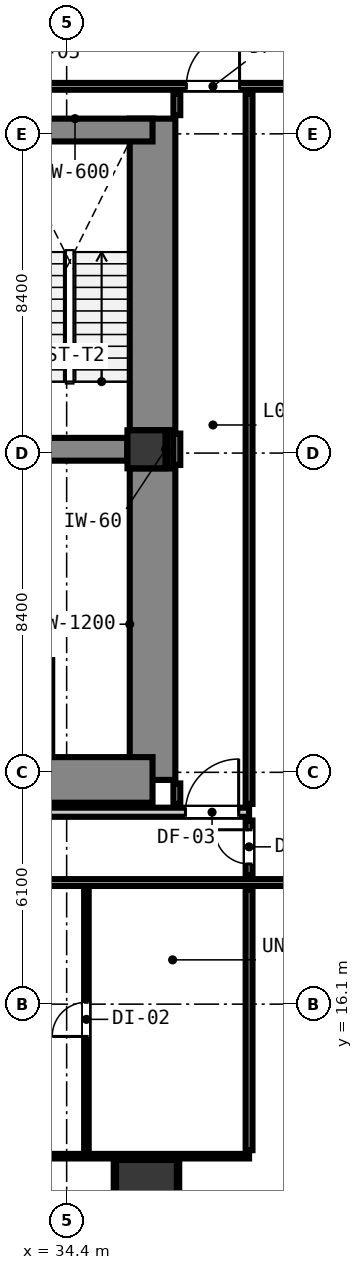
"""IFC4 building model, lengths in metres.
Left out: names, types, materials, properties, quantities, classifications, styles, units other than length and angle.
Written with IfcOpenShell. Run it as: python <this file> out.ifc"""

import sys

from ifc_helpers import new_model, si_unit, direction, frame, frame_2d, origin, origin_2d, place, context, subcontext, project, spatial, rectangle, extrude, element, fill, save


model = new_model("IFC4")
c1 = context("Model", 3, precision=1e-05, world=origin(), true_north=direction((0.0, 1.0)))
c2 = subcontext(c1, "Body", "Model", "MODEL_VIEW")
j1 = project(units=[si_unit("LENGTHUNIT", "METRE"), si_unit("PLANEANGLEUNIT", "RADIAN")], contexts=[c1])
p1 = place(None, origin())
s1 = spatial("IfcSite", under=j1, at=p1, CompositionType="ELEMENT")
p2 = place(p1, origin())
s2 = spatial("IfcBuilding", under=s1, at=p2, CompositionType="ELEMENT")
p3 = place(p2, frame((0.0, 0.0, 5.2)))
s3 = spatial("IfcBuildingStorey", under=s2, at=p3, CompositionType="ELEMENT", Elevation=5.2)
p4 = place(p3, frame((36.5, 30.7, 0.0), z_axis=(0.0, 0.0, 1.0), x_axis=(1.0, 0.0, 0.0)))
e1 = element("IfcColumn", 1, at=p4, inside=s3, PredefinedType="COLUMN", context=c2, shape_type="SweptSolid", body=[
    extrude(rectangle(XDim=1.0, YDim=1.0, at=origin_2d()), origin(), (0.0, 0.0, 1.0), 4.2),
])
p5 = place(p3, frame((36.66, 22.0, 0.0), z_axis=(0.0, 0.0, 1.0), x_axis=(0.0, 1.0, 0.0)))
e2 = element("IfcWall", 2, at=p5, inside=s3, PredefinedType="SHEAR", context=c2, shape_type="SweptSolid", body=[
    extrude(rectangle(XDim=8.195, YDim=1.2, at=frame_2d((4.098, 0.0))), origin(), (0.0, 0.0, 1.0), 4.2),
])
p6 = place(p3, frame((36.66, 31.205, 0.0), z_axis=(0.0, 0.0, 1.0), x_axis=(0.0, 1.0, 0.0)))
e3 = element("IfcWall", 3, at=p6, inside=s3, PredefinedType="SHEAR", context=c2, shape_type="SweptSolid", body=[
    extrude(rectangle(XDim=8.195, YDim=1.2, at=frame_2d((4.097, 0.0))), origin(), (0.0, 0.0, 1.0), 4.2),
])
p7 = place(p3, frame((29.705, 22.0, 0.0), z_axis=(0.0, 0.0, 1.0), x_axis=(1.0, 0.0, 0.0)))
e4 = element("IfcWall", 4, at=p7, inside=s3, PredefinedType="SHEAR", context=c2, shape_type="SweptSolid", body=[
    extrude(rectangle(XDim=6.955, YDim=1.2, at=frame_2d((3.478, 0.0))), origin(), (0.0, 0.0, 1.0), 4.2),
])
p8 = place(p3, frame((32.58, 39.1, 0.0), z_axis=(0.0, 0.0, 1.0), x_axis=(1.0, 0.0, 0.0)))
e5 = element("IfcWall", 5, at=p8, inside=s3, PredefinedType="SHEAR", context=c2, shape_type="SweptSolid", body=[
    extrude(rectangle(XDim=4.08, YDim=0.6, at=frame_2d((2.04, 0.0))), origin(), (0.0, 0.0, 1.0), 4.2),
])
p9 = place(p3, frame((32.58, 30.7, 0.0), z_axis=(0.0, 0.0, 1.0), x_axis=(1.0, 0.0, 0.0)))
e6 = element("IfcWall", 6, at=p9, inside=s3, PredefinedType="SHEAR", context=c2, shape_type="SweptSolid", body=[
    extrude(rectangle(XDim=3.415, YDim=0.6, at=frame_2d((1.708, 0.0))), origin(), (0.0, 0.0, 1.0), 4.2),
])
p10 = place(p3, frame((36.5, 11.2, 0.0), z_axis=(0.0, 0.0, 1.0), x_axis=(1.0, 0.0, 0.0)))
e7 = element("IfcColumn", 7, at=p10, inside=s3, PredefinedType="COLUMN", context=c2, shape_type="SweptSolid", body=[
    extrude(rectangle(XDim=1.6, YDim=1.6, at=origin_2d()), origin(), (0.0, 0.0, 1.0), 4.2),
])
p11 = place(p3, frame((33.9, 22.73, 0.0), z_axis=(0.0, 0.0, 1.0), x_axis=(0.0, 1.0, 0.0)))
e8 = element("IfcWall", 8, at=p11, inside=s3, PredefinedType="PARTITIONING", context=c2, shape_type="SweptSolid", body=[
    extrude(rectangle(XDim=2.422, YDim=0.24, at=frame_2d((1.211, 0.0))), origin(), (0.0, 0.0, 1.0), 3.92),
])
p12 = place(p3, frame((10.5, 21.15, 0.0), z_axis=(0.0, 0.0, 1.0), x_axis=(1.0, 0.0, 0.0)))
e9 = element("IfcWall", 9, at=p12, inside=s3, PredefinedType="PARTITIONING", context=c2, shape_type="SweptSolid", body=[
    extrude(rectangle(XDim=28.7, YDim=0.24, at=frame_2d((14.35, 0.0))), origin(), (0.0, 0.0, 1.0), 3.92),
])
p13 = place(p12, frame((7.71, 0.0, 0.0)))
e10 = element("IfcOpeningElement", 10, at=p13, cuts=e9, PredefinedType="OPENING", context=c2, shape_type="SweptSolid", body=[
    extrude(rectangle(XDim=1.1, YDim=2.15, at=frame_2d((0.55, 1.075))), frame((0.0, 0.13, 0.0), z_axis=(0.0, -1.0, 0.0), x_axis=(1.0, 0.0, 0.0)), (0.0, 0.0, 1.0), 0.26),
])
p14 = place(p12, frame((0.324, 0.0, 0.0)))
e11 = element("IfcOpeningElement", 11, at=p14, cuts=e9, PredefinedType="OPENING", context=c2, shape_type="SweptSolid", body=[
    extrude(rectangle(XDim=1.4, YDim=2.15, at=frame_2d((0.7, 1.075))), frame((0.0, 0.13, 0.0), z_axis=(0.0, -1.0, 0.0), x_axis=(1.0, 0.0, 0.0)), (0.0, 0.0, 1.0), 0.26),
])
p15 = place(p12, frame((27.026, 0.0, 0.0)))
e12 = element("IfcOpeningElement", 12, at=p15, cuts=e9, PredefinedType="OPENING", context=c2, shape_type="SweptSolid", body=[
    extrude(rectangle(XDim=1.4, YDim=2.15, at=frame_2d((0.7, 1.075))), frame((0.0, 0.13, 0.0), z_axis=(0.0, -1.0, 0.0), x_axis=(1.0, 0.0, 0.0)), (0.0, 0.0, 1.0), 0.26),
])
p16 = place(p3, frame((4.352, 19.3, 0.0), z_axis=(0.0, 0.0, 1.0), x_axis=(1.0, 0.0, 0.0)))
e13 = element("IfcWall", 13, at=p16, inside=s3, PredefinedType="PARTITIONING", context=c2, shape_type="SweptSolid", body=[
    extrude(rectangle(XDim=43.296, YDim=0.18, at=frame_2d((21.648, 0.0))), origin(), (0.0, 0.0, 1.0), 3.92),
])
p17 = place(p16, frame((12.248, 0.0, 0.0)))
e14 = element("IfcOpeningElement", 14, at=p17, cuts=e13, PredefinedType="OPENING", context=c2, shape_type="SweptSolid", body=[
    extrude(rectangle(XDim=1.0, YDim=2.15, at=frame_2d((0.5, 1.075))), frame((0.0, 0.1, 0.0), z_axis=(0.0, -1.0, 0.0), x_axis=(1.0, 0.0, 0.0)), (0.0, 0.0, 1.0), 0.2),
])
p18 = place(p16, frame((27.998, 0.0, 0.0)))
e15 = element("IfcOpeningElement", 15, at=p18, cuts=e13, PredefinedType="OPENING", context=c2, shape_type="SweptSolid", body=[
    extrude(rectangle(XDim=1.0, YDim=2.15, at=frame_2d((0.5, 1.075))), frame((0.0, 0.1, 0.0), z_axis=(0.0, -1.0, 0.0), x_axis=(1.0, 0.0, 0.0)), (0.0, 0.0, 1.0), 0.2),
])
p19 = place(p3, frame((10.5, 40.25, 0.0), z_axis=(0.0, 0.0, 1.0), x_axis=(1.0, 0.0, 0.0)))
e16 = element("IfcWall", 16, at=p19, inside=s3, PredefinedType="PARTITIONING", context=c2, shape_type="SweptSolid", body=[
    extrude(rectangle(XDim=37.148, YDim=0.18, at=frame_2d((18.574, 0.0))), origin(), (0.0, 0.0, 1.0), 3.92),
])
p20 = place(p19, frame((6.935, 0.0, 0.0)))
e17 = element("IfcOpeningElement", 17, at=p20, cuts=e16, PredefinedType="OPENING", context=c2, shape_type="SweptSolid", body=[
    extrude(rectangle(XDim=1.4, YDim=2.15, at=frame_2d((0.7, 1.075))), frame((0.0, 0.1, 0.0), z_axis=(0.0, -1.0, 0.0), x_axis=(1.0, 0.0, 0.0)), (0.0, 0.0, 1.0), 0.2),
])
p21 = place(p19, frame((0.324, 0.0, 0.0)))
e18 = element("IfcOpeningElement", 18, at=p21, cuts=e16, PredefinedType="OPENING", context=c2, shape_type="SweptSolid", body=[
    extrude(rectangle(XDim=1.4, YDim=2.15, at=frame_2d((0.7, 1.075))), frame((0.0, 0.1, 0.0), z_axis=(0.0, -1.0, 0.0), x_axis=(1.0, 0.0, 0.0)), (0.0, 0.0, 1.0), 0.2),
])
p22 = place(p19, frame((27.05, 0.0, 0.0)))
e19 = element("IfcOpeningElement", 19, at=p22, cuts=e16, PredefinedType="OPENING", context=c2, shape_type="SweptSolid", body=[
    extrude(rectangle(XDim=1.4, YDim=2.15, at=frame_2d((0.7, 1.075))), frame((0.0, 0.1, 0.0), z_axis=(0.0, -1.0, 0.0), x_axis=(1.0, 0.0, 0.0)), (0.0, 0.0, 1.0), 0.2),
])
p23 = place(p3, frame((10.5, 12.1, 0.0), z_axis=(0.0, 0.0, 1.0), x_axis=(1.0, 0.0, 0.0)))
e20 = element("IfcWall", 20, at=p23, inside=s3, PredefinedType="PARTITIONING", context=c2, shape_type="SweptSolid", body=[
    extrude(rectangle(XDim=28.7, YDim=0.12, at=frame_2d((14.35, 0.0))), origin(), (0.0, 0.0, 1.0), 3.92),
])
p24 = place(p3, frame((37.3, 21.368, 0.0), z_axis=(0.0, 0.0, 1.0), x_axis=(0.0, 1.0, 0.0)))
e21 = element("IfcWall", 21, at=p24, inside=s3, PredefinedType="PARTITIONING", context=c2, shape_type="SweptSolid", body=[
    extrude(rectangle(XDim=0.54, YDim=0.18, at=frame_2d((0.27, 0.0))), origin(), (0.0, 0.0, 1.0), 3.92),
])
p25 = place(p3, frame((37.3, 30.287, 0.0), z_axis=(0.0, 0.0, 1.0), x_axis=(0.0, 1.0, 0.0)))
e22 = element("IfcWall", 22, at=p25, inside=s3, PredefinedType="PARTITIONING", context=c2, shape_type="SweptSolid", body=[
    extrude(rectangle(XDim=0.826, YDim=0.18, at=frame_2d((0.413, 0.0))), origin(), (0.0, 0.0, 1.0), 3.92),
])
p26 = place(p3, frame((37.3, 39.492, 0.0), z_axis=(0.0, 0.0, 1.0), x_axis=(0.0, 1.0, 0.0)))
e23 = element("IfcWall", 23, at=p26, inside=s3, PredefinedType="PARTITIONING", context=c2, shape_type="SweptSolid", body=[
    extrude(rectangle(XDim=0.57, YDim=0.18, at=frame_2d((0.285, 0.0))), origin(), (0.0, 0.0, 1.0), 3.92),
])
p27 = place(p3, frame((39.2, 12.258, 0.0), z_axis=(0.0, 0.0, 1.0), x_axis=(0.0, 1.0, 0.0)))
e24 = element("IfcWall", 24, at=p27, inside=s3, PredefinedType="PARTITIONING", context=c2, shape_type="SweptSolid", body=[
    extrude(rectangle(XDim=6.854, YDim=0.18, at=frame_2d((3.427, 0.0))), origin(), (0.0, 0.0, 1.0), 3.92),
])
p28 = place(p3, frame((39.2, 19.488, 0.0), z_axis=(0.0, 0.0, 1.0), x_axis=(0.0, 1.0, 0.0)))
e25 = element("IfcWall", 25, at=p28, inside=s3, PredefinedType="PARTITIONING", context=c2, shape_type="SweptSolid", body=[
    extrude(rectangle(XDim=1.444, YDim=0.18, at=frame_2d((0.722, 0.0))), origin(), (0.0, 0.0, 1.0), 3.92),
])
p29 = place(p28, frame((0.301, 0.0, 0.0)))
e26 = element("IfcOpeningElement", 26, at=p29, cuts=e25, PredefinedType="OPENING", context=c2, shape_type="SweptSolid", body=[
    extrude(rectangle(XDim=0.9, YDim=2.1, at=frame_2d((0.45, 1.05))), frame((0.0, 0.1, 0.0), z_axis=(0.0, -1.0, 0.0), x_axis=(1.0, 0.0, 0.0)), (0.0, 0.0, 1.0), 0.2),
])
p30 = place(p3, frame((39.2, 21.368, 0.0), z_axis=(0.0, 0.0, 1.0), x_axis=(0.0, 1.0, 0.0)))
e27 = element("IfcWall", 27, at=p30, inside=s3, PredefinedType="PARTITIONING", context=c2, shape_type="SweptSolid", body=[
    extrude(rectangle(XDim=18.694, YDim=0.18, at=frame_2d((9.347, 0.0))), origin(), (0.0, 0.0, 1.0), 3.92),
])
p31 = place(p3, frame((34.92, 12.228, 0.0), z_axis=(0.0, 0.0, 1.0), x_axis=(0.0, 1.0, 0.0)))
e28 = element("IfcWall", 28, at=p31, inside=s3, PredefinedType="PARTITIONING", context=c2, shape_type="SweptSolid", body=[
    extrude(rectangle(XDim=6.914, YDim=0.12, at=frame_2d((3.457, 0.0))), origin(), (0.0, 0.0, 1.0), 3.92),
])
p32 = place(p31, frame((3.022, 0.0, 0.0)))
e29 = element("IfcOpeningElement", 29, at=p32, cuts=e28, PredefinedType="OPENING", context=c2, shape_type="SweptSolid", body=[
    extrude(rectangle(XDim=0.9, YDim=2.1, at=frame_2d((0.45, 1.05))), frame((0.0, 0.07, 0.0), z_axis=(0.0, -1.0, 0.0), x_axis=(1.0, 0.0, 0.0)), (0.0, 0.0, 1.0), 0.14),
])
p33 = place(p3, frame((37.032, 30.21, 0.0), z_axis=(0.0, 0.0, 1.0), x_axis=(0.0, 1.0, 0.0)))
e30 = element("IfcWall", 30, at=p33, inside=s3, PredefinedType="PARTITIONING", context=c2, shape_type="SweptSolid", body=[
    extrude(rectangle(XDim=0.98, YDim=0.06, at=frame_2d((0.49, 0.0))), origin(), (0.0, 0.0, 1.0), 1.45),
])
for number, where, z_axis, x_axis in (
    (31, (35.7, 12.032, 0.0), (0.0, 0.0, 1.0), (1.0, 0.0, 0.0)),
    (32, (35.668, 10.4, 0.0), (0.0, 0.0, 1.0), (0.0, 1.0, 0.0)),
    (33, (37.332, 10.4, 0.0), (0.0, 0.0, 1.0), (0.0, 1.0, 0.0)),
):
    element("IfcWall", number, at=place(p3, frame(where, z_axis=z_axis, x_axis=x_axis)), inside=s3, PredefinedType="PARTITIONING", context=c2, shape_type="SweptSolid", body=[
        extrude(rectangle(XDim=1.6, YDim=0.06, at=frame_2d((0.8, 0.0))), origin(), (0.0, 0.0, 1.0), 1.45),
    ])
p34 = place(p15, origin())
e34 = element("IfcDoor", 34, at=p34, inside=s3, OperationType="SINGLE_SWING_RIGHT", PredefinedType="DOOR", context=c2, shape_type="SweptSolid", body=[
    extrude(rectangle(XDim=1.4, YDim=2.15, at=frame_2d((0.7, 1.075))), frame((0.0, 0.025, 0.0), z_axis=(0.0, -1.0, 0.0), x_axis=(1.0, 0.0, 0.0)), (0.0, 0.0, 1.0), 0.05),
])
fill(e12, e34)
p35 = place(p22, origin())
e35 = element("IfcDoor", 35, at=p35, inside=s3, OperationType="SINGLE_SWING_RIGHT", PredefinedType="DOOR", context=c2, shape_type="SweptSolid", body=[
    extrude(rectangle(XDim=1.4, YDim=2.15, at=frame_2d((0.7, 1.075))), frame((0.0, 0.025, 0.0), z_axis=(0.0, -1.0, 0.0), x_axis=(1.0, 0.0, 0.0)), (0.0, 0.0, 1.0), 0.05),
])
fill(e19, e35)
p36 = place(p29, origin())
e36 = element("IfcDoor", 36, at=p36, inside=s3, OperationType="SINGLE_SWING_RIGHT", PredefinedType="DOOR", context=c2, shape_type="SweptSolid", body=[
    extrude(rectangle(XDim=0.9, YDim=2.1, at=frame_2d((0.45, 1.05))), frame((0.0, 0.025, 0.0), z_axis=(0.0, -1.0, 0.0), x_axis=(1.0, 0.0, 0.0)), (0.0, 0.0, 1.0), 0.05),
])
fill(e26, e36)
p37 = place(p32, origin())
e37 = element("IfcDoor", 37, at=p37, inside=s3, OperationType="SINGLE_SWING_LEFT", PredefinedType="DOOR", context=c2, shape_type="SweptSolid", body=[
    extrude(rectangle(XDim=0.9, YDim=2.1, at=frame_2d((0.45, 1.05))), frame((0.0, 0.025, 0.0), z_axis=(0.0, -1.0, 0.0), x_axis=(1.0, 0.0, 0.0)), (0.0, 0.0, 1.0), 0.05),
])
fill(e29, e37)
save(model, sys.argv[1])
